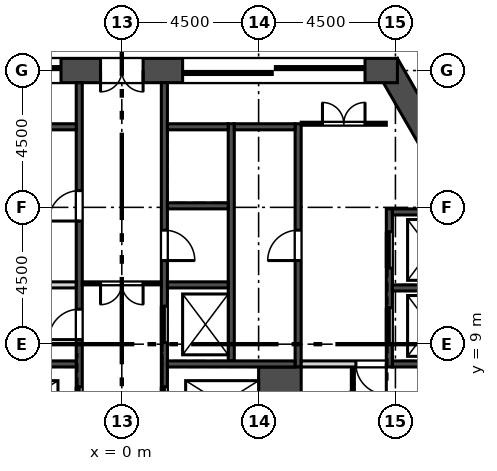
"""IFC4 building model, lengths in metres.
Left out: names, types, materials, properties, quantities, classifications, styles, units other than length and angle.
Written with IfcOpenShell. Run it as: python <this file> out.ifc"""

import sys

from ifc_helpers import new_model, si_unit, direction, frame, frame_2d, origin, place, context, subcontext, project, spatial, rectangle, extrude, element, fill, save


model = new_model("IFC4")
c1 = context("Model", 3, precision=1e-05, world=origin(), true_north=direction((0.0, 1.0)))
c2 = subcontext(c1, "Body", "Model", "MODEL_VIEW")
j1 = project(units=[si_unit("LENGTHUNIT", "METRE"), si_unit("PLANEANGLEUNIT", "RADIAN")], contexts=[c1])
p1 = place(None, origin())
s1 = spatial("IfcSite", under=j1, at=p1, CompositionType="ELEMENT")
p2 = place(p1, origin())
s2 = spatial("IfcBuilding", under=s1, at=p2, CompositionType="ELEMENT")
p3 = place(p2, frame((0.0, 0.0, 304.5)))
s3 = spatial("IfcBuildingStorey", under=s2, at=p3, CompositionType="ELEMENT", Elevation=304.5)
p4 = place(p3, frame((13.054, 10.692, 0.0), z_axis=(0.0, 0.0, 1.0), x_axis=(-0.500015780397, 0.866016292776, 0.0)))
e1 = element("IfcWall", 1, at=p4, inside=s3, PredefinedType="SHEAR", context=c2, shape_type="SweptSolid", body=[
    extrude(rectangle(XDim=8.67, YDim=0.8, at=frame_2d((4.335, 0.0))), origin(), (0.0, 0.0, 1.0), 5.4),
])
p5 = place(p3, frame((9.065, 18.0, 0.0), z_axis=(0.0, 0.0, 1.0), x_axis=(-1.0, 0.0, 0.0)))
e2 = element("IfcWall", 2, at=p5, inside=s3, PredefinedType="SHEAR", context=c2, shape_type="SweptSolid", body=[
    extrude(rectangle(XDim=18.13, YDim=0.8, at=frame_2d((9.065, 0.0))), origin(), (0.0, 0.0, 1.0), 5.4),
])
p6 = place(p5, frame((8.365, 0.0, 0.0)))
e3 = element("IfcOpeningElement", 3, at=p6, cuts=e2, PredefinedType="OPENING", context=c2, shape_type="SweptSolid", body=[
    extrude(rectangle(XDim=1.4, YDim=2.1, at=frame_2d((0.7, 1.05))), frame((0.0, 0.41, 0.0), z_axis=(0.0, -1.0, 0.0), x_axis=(1.0, 0.0, 0.0)), (0.0, 0.0, 1.0), 0.82),
])
p7 = place(p5, frame((11.065, 0.0, 0.0)))
e4 = element("IfcOpeningElement", 4, at=p7, cuts=e2, PredefinedType="OPENING", context=c2, shape_type="SweptSolid", body=[
    extrude(rectangle(XDim=6.0, YDim=2.4, at=frame_2d((3.0, 1.2))), frame((0.0, 0.41, 0.0), z_axis=(0.0, -1.0, 0.0), x_axis=(1.0, 0.0, 0.0)), (0.0, 0.0, 1.0), 0.82),
])
p8 = place(p5, frame((1.065, 0.0, 0.0)))
e5 = element("IfcOpeningElement", 5, at=p8, cuts=e2, PredefinedType="OPENING", context=c2, shape_type="SweptSolid", body=[
    extrude(rectangle(XDim=6.0, YDim=2.4, at=frame_2d((3.0, 1.2))), frame((0.0, 0.41, 0.0), z_axis=(0.0, -1.0, 0.0), x_axis=(1.0, 0.0, 0.0)), (0.0, 0.0, 1.0), 0.82),
])
p9 = place(p3, frame((24.905, 7.709, 0.0), z_axis=(0.0, 0.0, 1.0), x_axis=(-0.50000128873, 0.866024659735, 0.0)))
e6 = element("IfcWall", 6, at=p9, inside=s3, PredefinedType="SOLIDWALL", context=c2, shape_type="SweptSolid", body=[
    extrude(rectangle(XDim=41.104, YDim=0.34, at=frame_2d((20.552, 0.0))), origin(), (0.0, 0.0, 1.0), 5.0),
])
p10 = place(p9, frame((3.776, 0.0, 0.9)))
e7 = element("IfcOpeningElement", 7, at=p10, cuts=e6, PredefinedType="OPENING", context=c2, shape_type="SweptSolid", body=[
    extrude(rectangle(XDim=1.885, YDim=3.0, at=frame_2d((0.942, 1.5))), frame((0.0, 0.18, 0.0), z_axis=(0.0, -1.0, 0.0), x_axis=(1.0, 0.0, 0.0)), (0.0, 0.0, 1.0), 0.36),
])
p11 = place(p9, frame((6.776, 0.0, 0.9)))
e8 = element("IfcOpeningElement", 8, at=p11, cuts=e6, PredefinedType="OPENING", context=c2, shape_type="SweptSolid", body=[
    extrude(rectangle(XDim=1.885, YDim=3.0, at=frame_2d((0.942, 1.5))), frame((0.0, 0.18, 0.0), z_axis=(0.0, -1.0, 0.0), x_axis=(1.0, 0.0, 0.0)), (0.0, 0.0, 1.0), 0.36),
])
p12 = place(p9, frame((9.776, 0.0, 0.9)))
e9 = element("IfcOpeningElement", 9, at=p12, cuts=e6, PredefinedType="OPENING", context=c2, shape_type="SweptSolid", body=[
    extrude(rectangle(XDim=1.885, YDim=3.0, at=frame_2d((0.942, 1.5))), frame((0.0, 0.18, 0.0), z_axis=(0.0, -1.0, 0.0), x_axis=(1.0, 0.0, 0.0)), (0.0, 0.0, 1.0), 0.36),
])
p13 = place(p9, frame((12.776, 0.0, 0.9)))
e10 = element("IfcOpeningElement", 10, at=p13, cuts=e6, PredefinedType="OPENING", context=c2, shape_type="SweptSolid", body=[
    extrude(rectangle(XDim=1.885, YDim=3.0, at=frame_2d((0.942, 1.5))), frame((0.0, 0.18, 0.0), z_axis=(0.0, -1.0, 0.0), x_axis=(1.0, 0.0, 0.0)), (0.0, 0.0, 1.0), 0.36),
])
p14 = place(p9, frame((15.776, 0.0, 0.9)))
e11 = element("IfcOpeningElement", 11, at=p14, cuts=e6, PredefinedType="OPENING", context=c2, shape_type="SweptSolid", body=[
    extrude(rectangle(XDim=1.885, YDim=3.0, at=frame_2d((0.942, 1.5))), frame((0.0, 0.18, 0.0), z_axis=(0.0, -1.0, 0.0), x_axis=(1.0, 0.0, 0.0)), (0.0, 0.0, 1.0), 0.36),
])
p15 = place(p9, frame((18.776, 0.0, 0.9)))
e12 = element("IfcOpeningElement", 12, at=p15, cuts=e6, PredefinedType="OPENING", context=c2, shape_type="SweptSolid", body=[
    extrude(rectangle(XDim=1.885, YDim=3.0, at=frame_2d((0.942, 1.5))), frame((0.0, 0.18, 0.0), z_axis=(0.0, -1.0, 0.0), x_axis=(1.0, 0.0, 0.0)), (0.0, 0.0, 1.0), 0.36),
])
p16 = place(p9, frame((21.776, 0.0, 0.9)))
e13 = element("IfcOpeningElement", 13, at=p16, cuts=e6, PredefinedType="OPENING", context=c2, shape_type="SweptSolid", body=[
    extrude(rectangle(XDim=1.885, YDim=3.0, at=frame_2d((0.942, 1.5))), frame((0.0, 0.18, 0.0), z_axis=(0.0, -1.0, 0.0), x_axis=(1.0, 0.0, 0.0)), (0.0, 0.0, 1.0), 0.36),
])
p17 = place(p9, frame((24.776, 0.0, 0.9)))
e14 = element("IfcOpeningElement", 14, at=p17, cuts=e6, PredefinedType="OPENING", context=c2, shape_type="SweptSolid", body=[
    extrude(rectangle(XDim=1.885, YDim=3.0, at=frame_2d((0.942, 1.5))), frame((0.0, 0.18, 0.0), z_axis=(0.0, -1.0, 0.0), x_axis=(1.0, 0.0, 0.0)), (0.0, 0.0, 1.0), 0.36),
])
p18 = place(p9, frame((27.776, 0.0, 0.9)))
e15 = element("IfcOpeningElement", 15, at=p18, cuts=e6, PredefinedType="OPENING", context=c2, shape_type="SweptSolid", body=[
    extrude(rectangle(XDim=1.885, YDim=3.0, at=frame_2d((0.942, 1.5))), frame((0.0, 0.18, 0.0), z_axis=(0.0, -1.0, 0.0), x_axis=(1.0, 0.0, 0.0)), (0.0, 0.0, 1.0), 0.36),
])
p19 = place(p9, frame((30.776, 0.0, 0.9)))
e16 = element("IfcOpeningElement", 16, at=p19, cuts=e6, PredefinedType="OPENING", context=c2, shape_type="SweptSolid", body=[
    extrude(rectangle(XDim=1.885, YDim=3.0, at=frame_2d((0.942, 1.5))), frame((0.0, 0.18, 0.0), z_axis=(0.0, -1.0, 0.0), x_axis=(1.0, 0.0, 0.0)), (0.0, 0.0, 1.0), 0.36),
])
p20 = place(p9, frame((33.776, 0.0, 0.9)))
e17 = element("IfcOpeningElement", 17, at=p20, cuts=e6, PredefinedType="OPENING", context=c2, shape_type="SweptSolid", body=[
    extrude(rectangle(XDim=1.885, YDim=3.0, at=frame_2d((0.942, 1.5))), frame((0.0, 0.18, 0.0), z_axis=(0.0, -1.0, 0.0), x_axis=(1.0, 0.0, 0.0)), (0.0, 0.0, 1.0), 0.36),
])
p21 = place(p9, frame((36.776, 0.0, 0.9)))
e18 = element("IfcOpeningElement", 18, at=p21, cuts=e6, PredefinedType="OPENING", context=c2, shape_type="SweptSolid", body=[
    extrude(rectangle(XDim=1.885, YDim=3.0, at=frame_2d((0.942, 1.5))), frame((0.0, 0.18, 0.0), z_axis=(0.0, -1.0, 0.0), x_axis=(1.0, 0.0, 0.0)), (0.0, 0.0, 1.0), 0.36),
])
p22 = place(p3, frame((8.8, 8.25, -0.4), z_axis=(0.0, 0.0, 1.0), x_axis=(0.0, 1.0, 0.0)))
e19 = element("IfcWall", 19, at=p22, inside=s3, PredefinedType="SOLIDWALL", context=c2, shape_type="SweptSolid", body=[
    extrude(rectangle(XDim=5.2, YDim=0.2, at=frame_2d((2.6, 0.0))), origin(), (0.0, 0.0, 1.0), 5.4),
])
p23 = place(p22, frame((0.75, 0.0, 0.4)))
e20 = element("IfcOpeningElement", 20, at=p23, cuts=e19, PredefinedType="OPENING", context=c2, shape_type="SweptSolid", body=[
    extrude(rectangle(XDim=1.2, YDim=2.1, at=frame_2d((0.6, 1.05))), frame((0.0, 0.11, 0.0), z_axis=(0.0, -1.0, 0.0), x_axis=(1.0, 0.0, 0.0)), (0.0, 0.0, 1.0), 0.22),
])
p24 = place(p22, frame((3.25, 0.0, 0.4)))
e21 = element("IfcOpeningElement", 21, at=p24, cuts=e19, PredefinedType="OPENING", context=c2, shape_type="SweptSolid", body=[
    extrude(rectangle(XDim=1.2, YDim=2.1, at=frame_2d((0.6, 1.05))), frame((0.0, 0.11, 0.0), z_axis=(0.0, -1.0, 0.0), x_axis=(1.0, 0.0, 0.0)), (0.0, 0.0, 1.0), 0.22),
])
p25 = place(p3, frame((5.8, 8.25, -0.4), z_axis=(0.0, 0.0, 1.0), x_axis=(0.0, 1.0, 0.0)))
e22 = element("IfcWall", 22, at=p25, inside=s3, PredefinedType="SOLIDWALL", context=c2, shape_type="SweptSolid", body=[
    extrude(rectangle(XDim=8.0, YDim=0.2, at=frame_2d((4.0, 0.0))), origin(), (0.0, 0.0, 1.0), 5.4),
])
p26 = place(p25, frame((3.5, 0.0, 0.4)))
e23 = element("IfcOpeningElement", 23, at=p26, cuts=e22, PredefinedType="OPENING", context=c2, shape_type="SweptSolid", body=[
    extrude(rectangle(XDim=1.0, YDim=2.1, at=frame_2d((0.5, 1.05))), frame((0.0, 0.11, 0.0), z_axis=(0.0, -1.0, 0.0), x_axis=(1.0, 0.0, 0.0)), (0.0, 0.0, 1.0), 0.22),
])
p27 = place(p3, frame((3.6, 8.45, -0.4), z_axis=(0.0, 0.0, 1.0), x_axis=(0.0, 1.0, 0.0)))
e24 = element("IfcWall", 24, at=p27, inside=s3, PredefinedType="SOLIDWALL", context=c2, shape_type="SweptSolid", body=[
    extrude(rectangle(XDim=7.8, YDim=0.2, at=frame_2d((3.9, 0.0))), origin(), (0.0, 0.0, 1.0), 5.4),
])
p28 = place(p3, frame((-1.4, 5.85, -0.4), z_axis=(0.0, 0.0, 1.0), x_axis=(0.0, 1.0, 0.0)))
e25 = element("IfcWall", 25, at=p28, inside=s3, PredefinedType="SOLIDWALL", context=c2, shape_type="SweptSolid", body=[
    extrude(rectangle(XDim=11.75, YDim=0.2, at=frame_2d((5.875, 0.0))), origin(), (0.0, 0.0, 1.0), 5.4),
])
p29 = place(p28, frame((0.65, 0.0, 0.4)))
e26 = element("IfcOpeningElement", 26, at=p29, cuts=e25, PredefinedType="OPENING", context=c2, shape_type="SweptSolid", body=[
    extrude(rectangle(XDim=1.1, YDim=2.1, at=frame_2d((0.55, 1.05))), frame((0.0, 0.11, 0.0), z_axis=(0.0, -1.0, 0.0), x_axis=(1.0, 0.0, 0.0)), (0.0, 0.0, 1.0), 0.22),
])
p30 = place(p28, frame((3.3, 0.0, 0.4)))
e27 = element("IfcOpeningElement", 27, at=p30, cuts=e25, PredefinedType="OPENING", context=c2, shape_type="SweptSolid", body=[
    extrude(rectangle(XDim=1.0, YDim=2.1, at=frame_2d((0.5, 1.05))), frame((0.0, 0.11, 0.0), z_axis=(0.0, -1.0, 0.0), x_axis=(1.0, 0.0, 0.0)), (0.0, 0.0, 1.0), 0.22),
])
p31 = place(p28, frame((7.2, 0.0, 0.4)))
e28 = element("IfcOpeningElement", 28, at=p31, cuts=e25, PredefinedType="OPENING", context=c2, shape_type="SweptSolid", body=[
    extrude(rectangle(XDim=1.0, YDim=2.1, at=frame_2d((0.5, 1.05))), frame((0.0, 0.11, 0.0), z_axis=(0.0, -1.0, 0.0), x_axis=(1.0, 0.0, 0.0)), (0.0, 0.0, 1.0), 0.22),
])
p32 = place(p3, frame((1.4, 5.85, -0.4), z_axis=(0.0, 0.0, 1.0), x_axis=(0.0, 1.0, 0.0)))
e29 = element("IfcWall", 29, at=p32, inside=s3, PredefinedType="SOLIDWALL", context=c2, shape_type="SweptSolid", body=[
    extrude(rectangle(XDim=11.75, YDim=0.2, at=frame_2d((5.875, 0.0))), origin(), (0.0, 0.0, 1.0), 5.4),
])
p33 = place(p32, frame((3.2, 0.0, 0.4)))
e30 = element("IfcOpeningElement", 30, at=p33, cuts=e29, PredefinedType="OPENING", context=c2, shape_type="SweptSolid", body=[
    extrude(rectangle(XDim=1.2, YDim=2.1, at=frame_2d((0.6, 1.05))), frame((0.0, 0.11, 0.0), z_axis=(0.0, -1.0, 0.0), x_axis=(1.0, 0.0, 0.0)), (0.0, 0.0, 1.0), 0.22),
])
p34 = place(p32, frame((0.65, 0.0, 0.4)))
e31 = element("IfcOpeningElement", 31, at=p34, cuts=e29, PredefinedType="OPENING", context=c2, shape_type="SweptSolid", body=[
    extrude(rectangle(XDim=1.1, YDim=2.1, at=frame_2d((0.55, 1.05))), frame((0.0, 0.11, 0.0), z_axis=(0.0, -1.0, 0.0), x_axis=(1.0, 0.0, 0.0)), (0.0, 0.0, 1.0), 0.22),
])
p35 = place(p32, frame((5.9, 0.0, 0.4)))
e32 = element("IfcOpeningElement", 32, at=p35, cuts=e29, PredefinedType="OPENING", context=c2, shape_type="SweptSolid", body=[
    extrude(rectangle(XDim=1.0, YDim=2.1, at=frame_2d((0.5, 1.05))), frame((0.0, 0.11, 0.0), z_axis=(0.0, -1.0, 0.0), x_axis=(1.0, 0.0, 0.0)), (0.0, 0.0, 1.0), 0.22),
])
p36 = place(p3, frame((5.2, 5.85, -0.4), z_axis=(0.0, 0.0, 1.0), x_axis=(0.0, 1.0, 0.0)))
e33 = element("IfcWall", 33, at=p36, inside=s3, PredefinedType="SOLIDWALL", context=c2, shape_type="SweptSolid", body=[
    extrude(rectangle(XDim=2.4, YDim=1.4, at=frame_2d((1.2, 0.0))), origin(), (0.0, 0.0, 1.0), 5.4),
])
p37 = place(p3, frame((8.9, 8.35, -0.4), z_axis=(0.0, 0.0, 1.0), x_axis=(1.0, 0.0, 0.0)))
e34 = element("IfcWall", 34, at=p37, inside=s3, PredefinedType="SOLIDWALL", context=c2, shape_type="SweptSolid", body=[
    extrude(rectangle(XDim=2.0, YDim=0.2, at=frame_2d((1.0, 0.0))), origin(), (0.0, 0.0, 1.0), 5.4),
])
for number, where, z_axis, x_axis in (
    (35, (-5.7, 8.35, -0.4), (0.0, 0.0, 1.0), (1.0, 0.0, 0.0)),
    (36, (1.5, 8.35, -0.4), (0.0, 0.0, 1.0), (1.0, 0.0, 0.0)),
):
    element("IfcWall", number, at=place(p3, frame(where, z_axis=z_axis, x_axis=x_axis)), inside=s3, PredefinedType="SOLIDWALL", context=c2, shape_type="SweptSolid", body=[
        extrude(rectangle(XDim=4.2, YDim=0.2, at=frame_2d((2.1, 0.0))), origin(), (0.0, 0.0, 1.0), 5.4),
    ])
p38 = place(p3, frame((-3.5, 10.95, 0.0), z_axis=(0.0, 0.0, 1.0), x_axis=(1.0, 0.0, 0.0)))
e37 = element("IfcWall", 37, at=p38, inside=s3, PredefinedType="SOLIDWALL", context=c2, shape_type="SweptSolid", body=[
    extrude(rectangle(XDim=2.0, YDim=0.2, at=frame_2d((1.0, 0.0))), origin(), (0.0, 0.0, 1.0), 5.0),
])
for number, where, z_axis, x_axis in (
    (38, (-3.5, 16.15, -0.4), (0.0, 0.0, 1.0), (1.0, 0.0, 0.0)),
    (39, (8.9, 10.85, -0.4), (0.0, 0.0, 1.0), (1.0, 0.0, 0.0)),
    (40, (8.9, 13.35, -0.4), (0.0, 0.0, 1.0), (1.0, 0.0, 0.0)),
    (41, (3.7, 16.15, -0.4), (0.0, 0.0, 1.0), (1.0, 0.0, 0.0)),
    (42, (1.5, 10.95, -0.4), (0.0, 0.0, 1.0), (1.0, 0.0, 0.0)),
    (43, (1.5, 13.55, -0.4), (0.0, 0.0, 1.0), (1.0, 0.0, 0.0)),
    (44, (1.5, 16.15, -0.4), (0.0, 0.0, 1.0), (1.0, 0.0, 0.0)),
):
    element("IfcWall", number, at=place(p3, frame(where, z_axis=z_axis, x_axis=x_axis)), inside=s3, PredefinedType="SOLIDWALL", context=c2, shape_type="SweptSolid", body=[
        extrude(rectangle(XDim=2.0, YDim=0.2, at=frame_2d((1.0, 0.0))), origin(), (0.0, 0.0, 1.0), 5.4),
    ])
p39 = place(p3, frame((5.9, 16.25, 0.0), z_axis=(0.0, 0.0, 1.0), x_axis=(1.0, 0.0, 0.0)))
e45 = element("IfcWall", 45, at=p39, inside=s3, PredefinedType="PARTITIONING", context=c2, shape_type="SweptSolid", body=[
    extrude(rectangle(XDim=2.8, YDim=0.1, at=frame_2d((1.4, 0.0))), origin(), (0.0, 0.0, 1.0), 5.0),
])
p40 = place(p39, frame((0.7, 0.0, 0.0)))
e46 = element("IfcOpeningElement", 46, at=p40, cuts=e45, PredefinedType="OPENING", context=c2, shape_type="SweptSolid", body=[
    extrude(rectangle(XDim=1.4, YDim=2.1, at=frame_2d((0.7, 1.05))), frame((0.0, 0.06, 0.0), z_axis=(0.0, -1.0, 0.0), x_axis=(1.0, 0.0, 0.0)), (0.0, 0.0, 1.0), 0.12),
])
p41 = place(p3, frame((7.6, 5.85, 0.0), z_axis=(0.0, 0.0, 1.0), x_axis=(0.0, 1.0, 0.0)))
e47 = element("IfcWall", 47, at=p41, inside=s3, PredefinedType="PARTITIONING", context=c2, shape_type="SweptSolid", body=[
    extrude(rectangle(XDim=2.4, YDim=0.1, at=frame_2d((1.2, 0.0))), origin(), (0.0, 0.0, 1.0), 5.0),
])
p42 = place(p41, frame((0.7, 0.0, 0.0)))
e48 = element("IfcOpeningElement", 48, at=p42, cuts=e47, PredefinedType="OPENING", context=c2, shape_type="SweptSolid", body=[
    extrude(rectangle(XDim=0.9, YDim=2.1, at=frame_2d((0.45, 1.05))), frame((0.0, 0.06, 0.0), z_axis=(0.0, -1.0, 0.0), x_axis=(1.0, 0.0, 0.0)), (0.0, 0.0, 1.0), 0.12),
])
p43 = place(p3, frame((5.9, 8.35, 0.0), z_axis=(0.0, 0.0, 1.0), x_axis=(1.0, 0.0, 0.0)))
e49 = element("IfcWall", 49, at=p43, inside=s3, PredefinedType="SOLIDWALL", context=c2, shape_type="SweptSolid", body=[
    extrude(rectangle(XDim=2.8, YDim=0.2, at=frame_2d((1.4, 0.0))), origin(), (0.0, 0.0, 1.0), 5.0),
])
p44 = place(p43, frame((1.8, 0.0, 0.0)))
e50 = element("IfcOpeningElement", 50, at=p44, cuts=e49, PredefinedType="OPENING", context=c2, shape_type="SweptSolid", body=[
    extrude(rectangle(XDim=1.0, YDim=2.1, at=frame_2d((0.5, 1.05))), frame((0.0, 0.11, 0.0), z_axis=(0.0, -1.0, 0.0), x_axis=(1.0, 0.0, 0.0)), (0.0, 0.0, 1.0), 0.22),
])
p45 = place(p3, frame((-1.3, 11.0, 0.0), z_axis=(0.0, 0.0, 1.0), x_axis=(1.0, 0.0, 0.0)))
e51 = element("IfcWall", 51, at=p45, inside=s3, PredefinedType="PARTITIONING", context=c2, shape_type="SweptSolid", body=[
    extrude(rectangle(XDim=2.6, YDim=0.1, at=frame_2d((1.3, 0.0))), origin(), (0.0, 0.0, 1.0), 5.0),
])
p46 = place(p45, frame((0.6, 0.0, 0.0)))
e52 = element("IfcOpeningElement", 52, at=p46, cuts=e51, PredefinedType="OPENING", context=c2, shape_type="SweptSolid", body=[
    extrude(rectangle(XDim=1.4, YDim=2.1, at=frame_2d((0.7, 1.05))), frame((0.0, 0.06, 0.0), z_axis=(0.0, -1.0, 0.0), x_axis=(1.0, 0.0, 0.0)), (0.0, 0.0, 1.0), 0.12),
])
p47 = place(p29, origin())
e53 = element("IfcDoor", 53, at=p47, inside=s3, OperationType="SLIDING_TO_RIGHT", PredefinedType="DOOR", context=c2, shape_type="SweptSolid", body=[
    extrude(rectangle(XDim=1.1, YDim=2.1, at=frame_2d((0.55, 1.05))), frame((0.0, 0.025, 0.0), z_axis=(0.0, -1.0, 0.0), x_axis=(1.0, 0.0, 0.0)), (0.0, 0.0, 1.0), 0.05),
])
fill(e26, e53)
p48 = place(p23, origin())
e54 = element("IfcDoor", 54, at=p48, inside=s3, OperationType="SLIDING_TO_LEFT", PredefinedType="DOOR", context=c2, shape_type="SweptSolid", body=[
    extrude(rectangle(XDim=1.2, YDim=2.1, at=frame_2d((0.6, 1.05))), frame((0.0, 0.025, 0.0), z_axis=(0.0, -1.0, 0.0), x_axis=(1.0, 0.0, 0.0)), (0.0, 0.0, 1.0), 0.05),
])
fill(e20, e54)
p49 = place(p24, origin())
e55 = element("IfcDoor", 55, at=p49, inside=s3, OperationType="SLIDING_TO_LEFT", PredefinedType="DOOR", context=c2, shape_type="SweptSolid", body=[
    extrude(rectangle(XDim=1.2, YDim=2.1, at=frame_2d((0.6, 1.05))), frame((0.0, 0.025, 0.0), z_axis=(0.0, -1.0, 0.0), x_axis=(1.0, 0.0, 0.0)), (0.0, 0.0, 1.0), 0.05),
])
fill(e21, e55)
p50 = place(p33, origin())
e56 = element("IfcDoor", 56, at=p50, inside=s3, OperationType="SLIDING_TO_LEFT", PredefinedType="DOOR", context=c2, shape_type="SweptSolid", body=[
    extrude(rectangle(XDim=1.2, YDim=2.1, at=frame_2d((0.6, 1.05))), frame((0.0, 0.025, 0.0), z_axis=(0.0, -1.0, 0.0), x_axis=(1.0, 0.0, 0.0)), (0.0, 0.0, 1.0), 0.05),
])
fill(e30, e56)
p51 = place(p34, origin())
e57 = element("IfcDoor", 57, at=p51, inside=s3, OperationType="SLIDING_TO_RIGHT", PredefinedType="DOOR", context=c2, shape_type="SweptSolid", body=[
    extrude(rectangle(XDim=1.1, YDim=2.1, at=frame_2d((0.55, 1.05))), frame((0.0, 0.025, 0.0), z_axis=(0.0, -1.0, 0.0), x_axis=(1.0, 0.0, 0.0)), (0.0, 0.0, 1.0), 0.05),
])
fill(e31, e57)
p52 = place(p30, origin())
e58 = element("IfcDoor", 58, at=p52, inside=s3, OperationType="SINGLE_SWING_LEFT", PredefinedType="DOOR", context=c2, shape_type="SweptSolid", body=[
    extrude(rectangle(XDim=1.0, YDim=2.1, at=frame_2d((0.5, 1.05))), frame((0.0, 0.025, 0.0), z_axis=(0.0, -1.0, 0.0), x_axis=(1.0, 0.0, 0.0)), (0.0, 0.0, 1.0), 0.05),
])
fill(e27, e58)
p53 = place(p31, origin())
e59 = element("IfcDoor", 59, at=p53, inside=s3, OperationType="SINGLE_SWING_LEFT", PredefinedType="DOOR", context=c2, shape_type="SweptSolid", body=[
    extrude(rectangle(XDim=1.0, YDim=2.1, at=frame_2d((0.5, 1.05))), frame((0.0, 0.025, 0.0), z_axis=(0.0, -1.0, 0.0), x_axis=(1.0, 0.0, 0.0)), (0.0, 0.0, 1.0), 0.05),
])
fill(e28, e59)
p54 = place(p26, origin())
e60 = element("IfcDoor", 60, at=p54, inside=s3, OperationType="SINGLE_SWING_LEFT", PredefinedType="DOOR", context=c2, shape_type="SweptSolid", body=[
    extrude(rectangle(XDim=1.0, YDim=2.1, at=frame_2d((0.5, 1.05))), frame((0.0, 0.025, 0.0), z_axis=(0.0, -1.0, 0.0), x_axis=(1.0, 0.0, 0.0)), (0.0, 0.0, 1.0), 0.05),
])
fill(e23, e60)
p55 = place(p35, frame((1.0, 0.0, 0.0), z_axis=(0.0, 0.0, 1.0), x_axis=(-1.0, 0.0, 0.0)))
e61 = element("IfcDoor", 61, at=p55, inside=s3, OperationType="SINGLE_SWING_RIGHT", PredefinedType="DOOR", context=c2, shape_type="SweptSolid", body=[
    extrude(rectangle(XDim=1.0, YDim=2.1, at=frame_2d((0.5, 1.05))), frame((0.0, 0.025, 0.0), z_axis=(0.0, -1.0, 0.0), x_axis=(1.0, 0.0, 0.0)), (0.0, 0.0, 1.0), 0.05),
])
fill(e32, e61)
p56 = place(p40, origin())
e62 = element("IfcDoor", 62, at=p56, inside=s3, OperationType="DOUBLE_DOOR_SINGLE_SWING", PredefinedType="DOOR", context=c2, shape_type="SweptSolid", body=[
    extrude(rectangle(XDim=1.4, YDim=2.1, at=frame_2d((0.7, 1.05))), frame((0.0, 0.025, 0.0), z_axis=(0.0, -1.0, 0.0), x_axis=(1.0, 0.0, 0.0)), (0.0, 0.0, 1.0), 0.05),
])
fill(e46, e62)
p57 = place(p44, frame((1.0, 0.0, 0.0), z_axis=(0.0, 0.0, 1.0), x_axis=(-1.0, 0.0, 0.0)))
e63 = element("IfcDoor", 63, at=p57, inside=s3, OperationType="SINGLE_SWING_LEFT", PredefinedType="DOOR", context=c2, shape_type="SweptSolid", body=[
    extrude(rectangle(XDim=1.0, YDim=2.1, at=frame_2d((0.5, 1.05))), frame((0.0, 0.025, 0.0), z_axis=(0.0, -1.0, 0.0), x_axis=(1.0, 0.0, 0.0)), (0.0, 0.0, 1.0), 0.05),
])
fill(e50, e63)
p58 = place(p46, frame((1.4, 0.0, 0.0), z_axis=(0.0, 0.0, 1.0), x_axis=(-1.0, 0.0, 0.0)))
e64 = element("IfcDoor", 64, at=p58, inside=s3, OperationType="DOUBLE_DOOR_SINGLE_SWING", PredefinedType="DOOR", context=c2, shape_type="SweptSolid", body=[
    extrude(rectangle(XDim=1.4, YDim=2.1, at=frame_2d((0.7, 1.05))), frame((0.0, 0.025, 0.0), z_axis=(0.0, -1.0, 0.0), x_axis=(1.0, 0.0, 0.0)), (0.0, 0.0, 1.0), 0.05),
])
fill(e52, e64)
p59 = place(p6, origin())
e65 = element("IfcDoor", 65, at=p59, inside=s3, OperationType="DOUBLE_DOOR_SINGLE_SWING", PredefinedType="DOOR", context=c2, shape_type="SweptSolid", body=[
    extrude(rectangle(XDim=1.4, YDim=2.1, at=frame_2d((0.7, 1.05))), frame((0.0, 0.025, 0.0), z_axis=(0.0, -1.0, 0.0), x_axis=(1.0, 0.0, 0.0)), (0.0, 0.0, 1.0), 0.05),
])
fill(e3, e65)
p60 = place(p7, origin())
e66 = element("IfcDoor", 66, at=p60, inside=s3, OperationType="DOUBLE_DOOR_SLIDING", PredefinedType="DOOR", context=c2, shape_type="SweptSolid", body=[
    extrude(rectangle(XDim=6.0, YDim=2.4, at=frame_2d((3.0, 1.2))), frame((0.0, 0.025, 0.0), z_axis=(0.0, -1.0, 0.0), x_axis=(1.0, 0.0, 0.0)), (0.0, 0.0, 1.0), 0.05),
])
fill(e4, e66)
p61 = place(p8, origin())
e67 = element("IfcDoor", 67, at=p61, inside=s3, OperationType="DOUBLE_DOOR_SLIDING", PredefinedType="DOOR", context=c2, shape_type="SweptSolid", body=[
    extrude(rectangle(XDim=6.0, YDim=2.4, at=frame_2d((3.0, 1.2))), frame((0.0, 0.025, 0.0), z_axis=(0.0, -1.0, 0.0), x_axis=(1.0, 0.0, 0.0)), (0.0, 0.0, 1.0), 0.05),
])
fill(e5, e67)
save(model, sys.argv[1])
